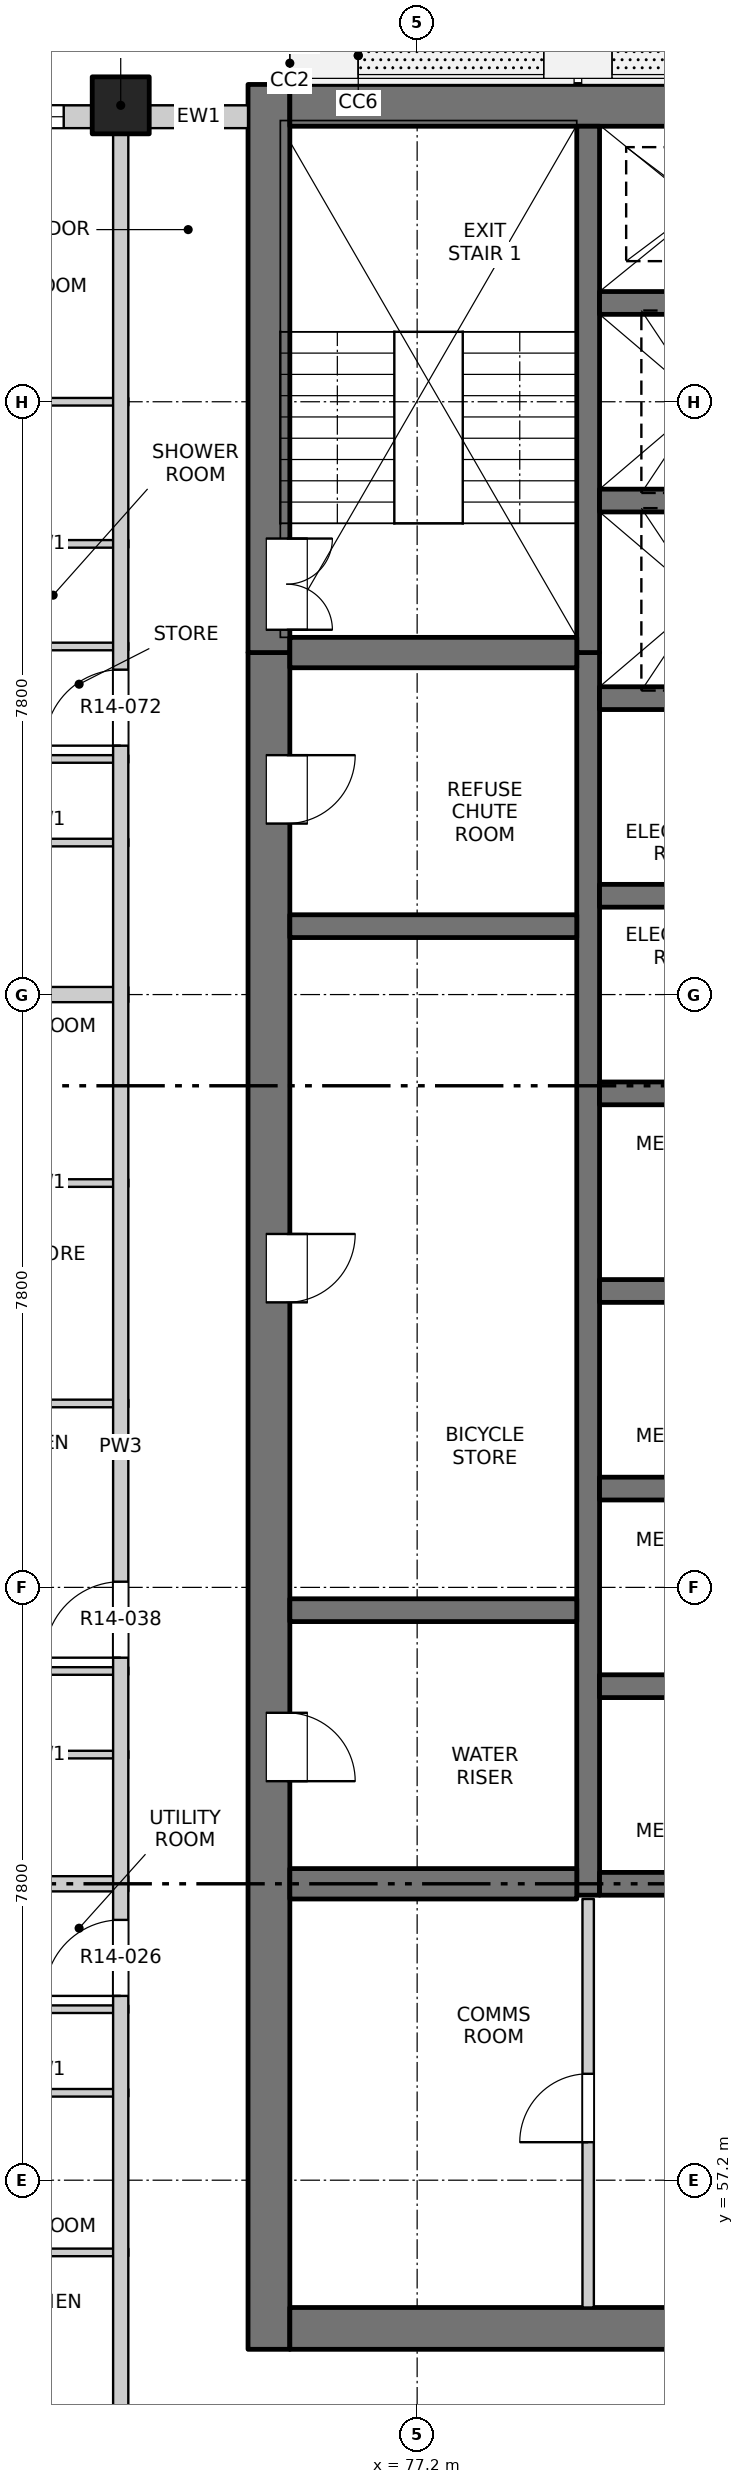
"""IFC4 building model, lengths in metres.
Left out: names, types, materials, properties, quantities, classifications, styles, units other than length and angle.
Written with IfcOpenShell. Run it as: python <this file> out.ifc"""

import sys

from ifc_helpers import new_model, si_unit, direction, frame, frame_2d, origin, origin_2d, place, context, subcontext, project, spatial, rectangle, extrude, element, fill, save


model = new_model("IFC4")
c1 = context("Model", 3, precision=1e-05, world=origin(), true_north=direction((0.0, 1.0)))
c2 = subcontext(c1, "Body", "Model", "MODEL_VIEW")
j1 = project(units=[si_unit("LENGTHUNIT", "METRE"), si_unit("PLANEANGLEUNIT", "RADIAN")], contexts=[c1])
p1 = place(None, origin())
s1 = spatial("IfcSite", under=j1, at=p1, CompositionType="ELEMENT")
p2 = place(p1, origin())
s2 = spatial("IfcBuilding", under=s1, at=p2, CompositionType="ELEMENT")
p3 = place(p2, frame((0.0, 0.0, 152.0)))
s3 = spatial("IfcBuildingStorey", under=s2, at=p3, CompositionType="ELEMENT", Elevation=152.0)
p4 = place(p3, frame((73.3, 84.5, -0.25), z_axis=(0.0, 0.0, 1.0), x_axis=(1.0, 0.0, 0.0)))
e1 = element("IfcColumn", 1, at=p4, inside=s3, PredefinedType="COLUMN", context=c2, shape_type="SweptSolid", body=[
    extrude(rectangle(XDim=0.75, YDim=0.75, at=origin_2d()), origin(), (0.0, 0.0, 1.0), 3.4),
])
p5 = place(p3, frame((75.25, 54.975, -0.25), z_axis=(0.0, 0.0, 1.0), x_axis=(0.0, 1.0, 0.0)))
e2 = element("IfcWall", 2, at=p5, inside=s3, PredefinedType="SOLIDWALL", context=c2, shape_type="SweptSolid", body=[
    extrude(rectangle(XDim=22.325, YDim=0.55, at=frame_2d((11.163, 0.0))), origin(), (0.0, 0.0, 1.0), 3.4),
])
p6 = place(p5, frame((7.475, 0.0, 0.25)))
e3 = element("IfcOpeningElement", 3, at=p6, cuts=e2, PredefinedType="OPENING", context=c2, shape_type="SweptSolid", body=[
    extrude(rectangle(XDim=0.9, YDim=2.1, at=frame_2d((0.45, 1.05))), frame((0.0, 0.285, 0.0), z_axis=(0.0, -1.0, 0.0), x_axis=(1.0, 0.0, 0.0)), (0.0, 0.0, 1.0), 0.57),
])
p7 = place(p5, frame((13.775, 0.0, 0.25)))
e4 = element("IfcOpeningElement", 4, at=p7, cuts=e2, PredefinedType="OPENING", context=c2, shape_type="SweptSolid", body=[
    extrude(rectangle(XDim=0.9, YDim=2.1, at=frame_2d((0.45, 1.05))), frame((0.0, 0.285, 0.0), z_axis=(0.0, -1.0, 0.0), x_axis=(1.0, 0.0, 0.0)), (0.0, 0.0, 1.0), 0.57),
])
p8 = place(p5, frame((20.075, 0.0, 0.25)))
e5 = element("IfcOpeningElement", 5, at=p8, cuts=e2, PredefinedType="OPENING", context=c2, shape_type="SweptSolid", body=[
    extrude(rectangle(XDim=0.9, YDim=2.1, at=frame_2d((0.45, 1.05))), frame((0.0, 0.285, 0.0), z_axis=(0.0, -1.0, 0.0), x_axis=(1.0, 0.0, 0.0)), (0.0, 0.0, 1.0), 0.57),
])
p9 = place(p3, frame((75.25, 77.3, -0.25), z_axis=(0.0, 0.0, 1.0), x_axis=(0.0, 1.0, 0.0)))
e6 = element("IfcWall", 6, at=p9, inside=s3, PredefinedType="SOLIDWALL", context=c2, shape_type="SweptSolid", body=[
    extrude(rectangle(XDim=7.475, YDim=0.55, at=frame_2d((3.737, 0.0))), origin(), (0.0, 0.0, 1.0), 3.4),
])
p10 = place(p9, frame((0.3, 0.0, 0.25)))
e7 = element("IfcOpeningElement", 7, at=p10, cuts=e6, PredefinedType="OPENING", context=c2, shape_type="SweptSolid", body=[
    extrude(rectangle(XDim=1.2, YDim=2.1, at=frame_2d((0.6, 1.05))), frame((0.0, 0.285, 0.0), z_axis=(0.0, -1.0, 0.0), x_axis=(1.0, 0.0, 0.0)), (0.0, 0.0, 1.0), 0.57),
])
p11 = place(p3, frame((75.525, 55.25, -0.25), z_axis=(0.0, 0.0, 1.0), x_axis=(1.0, 0.0, 0.0)))
e8 = element("IfcWall", 8, at=p11, inside=s3, PredefinedType="SOLIDWALL", context=c2, shape_type="SweptSolid", body=[
    extrude(rectangle(XDim=18.95, YDim=0.55, at=frame_2d((9.475, 0.0))), origin(), (0.0, 0.0, 1.0), 3.4),
])
p12 = place(p11, frame((8.725, 0.0, 0.25)))
e9 = element("IfcOpeningElement", 9, at=p12, cuts=e8, PredefinedType="OPENING", context=c2, shape_type="SweptSolid", body=[
    extrude(rectangle(XDim=1.5, YDim=2.1, at=frame_2d((0.75, 1.05))), frame((0.0, 0.285, 0.0), z_axis=(0.0, -1.0, 0.0), x_axis=(1.0, 0.0, 0.0)), (0.0, 0.0, 1.0), 0.57),
])
p13 = place(p3, frame((75.525, 84.5, -0.25), z_axis=(0.0, 0.0, 1.0), x_axis=(1.0, 0.0, 0.0)))
e10 = element("IfcWall", 10, at=p13, inside=s3, PredefinedType="SOLIDWALL", context=c2, shape_type="SweptSolid", body=[
    extrude(rectangle(XDim=18.95, YDim=0.55, at=frame_2d((9.475, 0.0))), origin(), (0.0, 0.0, 1.0), 3.4),
])
p14 = place(p3, frame((79.45, 60.95, -0.25), z_axis=(0.0, 0.0, 1.0), x_axis=(0.0, 1.0, 0.0)))
e11 = element("IfcWall", 11, at=p14, inside=s3, PredefinedType="SOLIDWALL", context=c2, shape_type="SweptSolid", body=[
    extrude(rectangle(XDim=16.35, YDim=0.3, at=frame_2d((8.175, 0.0))), origin(), (0.0, 0.0, 1.0), 3.4),
])
p15 = place(p3, frame((79.45, 77.3, -0.25), z_axis=(0.0, 0.0, 1.0), x_axis=(0.0, 1.0, 0.0)))
e12 = element("IfcWall", 12, at=p15, inside=s3, PredefinedType="SOLIDWALL", context=c2, shape_type="SweptSolid", body=[
    extrude(rectangle(XDim=6.925, YDim=0.3, at=frame_2d((3.462, 0.0))), origin(), (0.0, 0.0, 1.0), 3.4),
])
for number, where, z_axis, x_axis in (
    (13, (79.6, 61.1, -0.25), (0.0, 0.0, 1.0), (1.0, 0.0, 0.0)),
    (14, (79.6, 63.7, -0.25), (0.0, 0.0, 1.0), (1.0, 0.0, 0.0)),
    (15, (79.6, 66.3, -0.25), (0.0, 0.0, 1.0), (1.0, 0.0, 0.0)),
    (16, (79.6, 68.9, -0.25), (0.0, 0.0, 1.0), (1.0, 0.0, 0.0)),
    (17, (79.6, 71.5, -0.25), (0.0, 0.0, 1.0), (1.0, 0.0, 0.0)),
    (18, (79.6, 74.1, -0.25), (0.0, 0.0, 1.0), (1.0, 0.0, 0.0)),
    (19, (79.6, 76.7, -0.25), (0.0, 0.0, 1.0), (1.0, 0.0, 0.0)),
    (20, (79.6, 79.3, -0.25), (0.0, 0.0, 1.0), (1.0, 0.0, 0.0)),
    (21, (79.6, 81.9, -0.25), (0.0, 0.0, 1.0), (1.0, 0.0, 0.0)),
):
    element("IfcWall", number, at=place(p3, frame(where, z_axis=z_axis, x_axis=x_axis)), inside=s3, PredefinedType="SOLIDWALL", context=c2, shape_type="SweptSolid", body=[
        extrude(rectangle(XDim=3.0, YDim=0.3, at=frame_2d((1.5, 0.0))), origin(), (0.0, 0.0, 1.0), 3.4),
    ])
p16 = place(p3, frame((75.525, 61.1, -0.25), z_axis=(0.0, 0.0, 1.0), x_axis=(1.0, 0.0, 0.0)))
e22 = element("IfcWall", 22, at=p16, inside=s3, PredefinedType="SOLIDWALL", context=c2, shape_type="SweptSolid", body=[
    extrude(rectangle(XDim=3.775, YDim=0.4, at=frame_2d((1.888, 0.0))), origin(), (0.0, 0.0, 1.0), 3.4),
])
for number, where, z_axis, x_axis in (
    (23, (75.525, 64.7, -0.25), (0.0, 0.0, 1.0), (1.0, 0.0, 0.0)),
    (24, (75.525, 73.7, -0.25), (0.0, 0.0, 1.0), (1.0, 0.0, 0.0)),
):
    element("IfcWall", number, at=place(p3, frame(where, z_axis=z_axis, x_axis=x_axis)), inside=s3, PredefinedType="SOLIDWALL", context=c2, shape_type="SweptSolid", body=[
        extrude(rectangle(XDim=3.775, YDim=0.3, at=frame_2d((1.888, 0.0))), origin(), (0.0, 0.0, 1.0), 3.4),
    ])
p17 = place(p3, frame((75.525, 77.3, -0.25), z_axis=(0.0, 0.0, 1.0), x_axis=(1.0, 0.0, 0.0)))
e25 = element("IfcWall", 25, at=p17, inside=s3, PredefinedType="SOLIDWALL", context=c2, shape_type="SweptSolid", body=[
    extrude(rectangle(XDim=3.775, YDim=0.4, at=frame_2d((1.888, 0.0))), origin(), (0.0, 0.0, 1.0), 3.4),
])
p18 = place(p3, frame((69.4, 84.35, 0.0), z_axis=(0.0, 0.0, 1.0), x_axis=(1.0, 0.0, 0.0)))
e26 = element("IfcWall", 26, at=p18, inside=s3, PredefinedType="SOLIDWALL", context=c2, shape_type="SweptSolid", body=[
    extrude(rectangle(XDim=3.525, YDim=0.3, at=frame_2d((1.763, 0.0))), origin(), (0.0, 0.0, 1.0), 2.7),
])
p19 = place(p18, frame((0.75, 0.0, 0.9)))
e27 = element("IfcOpeningElement", 27, at=p19, cuts=e26, PredefinedType="OPENING", context=c2, shape_type="SweptSolid", body=[
    extrude(rectangle(XDim=2.4, YDim=1.8, at=frame_2d((1.2, 0.9))), frame((0.0, 0.16, 0.0), z_axis=(0.0, -1.0, 0.0), x_axis=(1.0, 0.0, 0.0)), (0.0, 0.0, 1.0), 0.32),
])
p20 = place(p3, frame((73.675, 84.35, 0.0), z_axis=(0.0, 0.0, 1.0), x_axis=(1.0, 0.0, 0.0)))
e28 = element("IfcWall", 28, at=p20, inside=s3, PredefinedType="SOLIDWALL", context=c2, shape_type="SweptSolid", body=[
    extrude(rectangle(XDim=1.3, YDim=0.3, at=frame_2d((0.65, 0.0))), origin(), (0.0, 0.0, 1.0), 2.7),
])
for number, where, z_axis, x_axis in (
    (29, (71.18, 56.25, 0.0), (0.0, 0.0, 1.0), (1.0, 0.0, 0.0)),
    (30, (71.18, 58.35, 0.0), (0.0, 0.0, 1.0), (1.0, 0.0, 0.0)),
    (31, (71.18, 59.45, 0.0), (0.0, 0.0, 1.0), (1.0, 0.0, 0.0)),
):
    element("IfcWall", number, at=place(p3, frame(where, z_axis=z_axis, x_axis=x_axis)), inside=s3, PredefinedType="PARTITIONING", context=c2, shape_type="SweptSolid", body=[
        extrude(rectangle(XDim=2.22, YDim=0.1, at=frame_2d((1.11, 0.0))), origin(), (0.0, 0.0, 1.0), 3.15),
    ])
p21 = place(p3, frame((65.8, 61.1, 0.0), z_axis=(0.0, 0.0, 1.0), x_axis=(1.0, 0.0, 0.0)))
e32 = element("IfcWall", 32, at=p21, inside=s3, PredefinedType="PARTITIONING", context=c2, shape_type="SweptSolid", body=[
    extrude(rectangle(XDim=7.6, YDim=0.2, at=frame_2d((3.8, 0.0))), origin(), (0.0, 0.0, 1.0), 2.55),
])
for number, where, z_axis, x_axis in (
    (33, (71.18, 62.8, 0.0), (0.0, 0.0, 1.0), (1.0, 0.0, 0.0)),
    (34, (71.18, 63.9, 0.0), (0.0, 0.0, 1.0), (1.0, 0.0, 0.0)),
    (35, (71.18, 67.42, 0.0), (0.0, 0.0, 1.0), (1.0, 0.0, 0.0)),
    (36, (71.18, 70.32, 0.0), (0.0, 0.0, 1.0), (1.0, 0.0, 0.0)),
):
    element("IfcWall", number, at=place(p3, frame(where, z_axis=z_axis, x_axis=x_axis)), inside=s3, PredefinedType="PARTITIONING", context=c2, shape_type="SweptSolid", body=[
        extrude(rectangle(XDim=2.22, YDim=0.1, at=frame_2d((1.11, 0.0))), origin(), (0.0, 0.0, 1.0), 3.15),
    ])
p22 = place(p3, frame((65.8, 72.8, 0.0), z_axis=(0.0, 0.0, 1.0), x_axis=(1.0, 0.0, 0.0)))
e37 = element("IfcWall", 37, at=p22, inside=s3, PredefinedType="PARTITIONING", context=c2, shape_type="SweptSolid", body=[
    extrude(rectangle(XDim=7.6, YDim=0.2, at=frame_2d((3.8, 0.0))), origin(), (0.0, 0.0, 1.0), 3.15),
])
for number, where, z_axis, x_axis in (
    (38, (71.18, 74.8, 0.0), (0.0, 0.0, 1.0), (1.0, 0.0, 0.0)),
    (39, (71.18, 75.9, 0.0), (0.0, 0.0, 1.0), (1.0, 0.0, 0.0)),
    (40, (71.18, 77.38, 0.0), (0.0, 0.0, 1.0), (1.0, 0.0, 0.0)),
    (41, (71.18, 78.73, 0.0), (0.0, 0.0, 1.0), (1.0, 0.0, 0.0)),
):
    element("IfcWall", number, at=place(p3, frame(where, z_axis=z_axis, x_axis=x_axis)), inside=s3, PredefinedType="PARTITIONING", context=c2, shape_type="SweptSolid", body=[
        extrude(rectangle(XDim=2.22, YDim=0.1, at=frame_2d((1.11, 0.0))), origin(), (0.0, 0.0, 1.0), 3.15),
    ])
p23 = place(p3, frame((65.8, 80.6, 0.0), z_axis=(0.0, 0.0, 1.0), x_axis=(1.0, 0.0, 0.0)))
e42 = element("IfcWall", 42, at=p23, inside=s3, PredefinedType="PARTITIONING", context=c2, shape_type="SweptSolid", body=[
    extrude(rectangle(XDim=7.6, YDim=0.1, at=frame_2d((3.8, 0.0))), origin(), (0.0, 0.0, 1.0), 3.15),
])
p24 = place(p23, frame((4.14, 0.0, 0.0)))
e43 = element("IfcOpeningElement", 43, at=p24, cuts=e42, PredefinedType="OPENING", context=c2, shape_type="SweptSolid", body=[
    extrude(rectangle(XDim=0.9, YDim=2.1, at=frame_2d((0.45, 1.05))), frame((0.0, 0.06, 0.0), z_axis=(0.0, -1.0, 0.0), x_axis=(1.0, 0.0, 0.0)), (0.0, 0.0, 1.0), 0.12),
])
p25 = place(p3, frame((73.3, 49.5, 0.0), z_axis=(0.0, 0.0, 1.0), x_axis=(0.0, 1.0, 0.0)))
e44 = element("IfcWall", 44, at=p25, inside=s3, PredefinedType="PARTITIONING", context=c2, shape_type="SweptSolid", body=[
    extrude(rectangle(XDim=34.7, YDim=0.2, at=frame_2d((17.35, 0.0))), origin(), (0.0, 0.0, 1.0), 3.15),
])
p26 = place(p25, frame((10.125, 0.0, 0.0)))
e45 = element("IfcOpeningElement", 45, at=p26, cuts=e44, PredefinedType="OPENING", context=c2, shape_type="SweptSolid", body=[
    extrude(rectangle(XDim=1.0, YDim=2.1, at=frame_2d((0.5, 1.05))), frame((0.0, 0.11, 0.0), z_axis=(0.0, -1.0, 0.0), x_axis=(1.0, 0.0, 0.0)), (0.0, 0.0, 1.0), 0.22),
])
p27 = place(p25, frame((14.575, 0.0, 0.0)))
e46 = element("IfcOpeningElement", 46, at=p27, cuts=e44, PredefinedType="OPENING", context=c2, shape_type="SweptSolid", body=[
    extrude(rectangle(XDim=1.0, YDim=2.1, at=frame_2d((0.5, 1.05))), frame((0.0, 0.11, 0.0), z_axis=(0.0, -1.0, 0.0), x_axis=(1.0, 0.0, 0.0)), (0.0, 0.0, 1.0), 0.22),
])
p28 = place(p25, frame((26.575, 0.0, 0.0)))
e47 = element("IfcOpeningElement", 47, at=p28, cuts=e44, PredefinedType="OPENING", context=c2, shape_type="SweptSolid", body=[
    extrude(rectangle(XDim=1.0, YDim=2.1, at=frame_2d((0.5, 1.05))), frame((0.0, 0.11, 0.0), z_axis=(0.0, -1.0, 0.0), x_axis=(1.0, 0.0, 0.0)), (0.0, 0.0, 1.0), 0.22),
])
p29 = place(p3, frame((79.45, 55.525, 0.0), z_axis=(0.0, 0.0, 1.0), x_axis=(0.0, 1.0, 0.0)))
e48 = element("IfcWall", 48, at=p29, inside=s3, PredefinedType="PARTITIONING", context=c2, shape_type="SweptSolid", body=[
    extrude(rectangle(XDim=5.375, YDim=0.15, at=frame_2d((2.688, 0.0))), origin(), (0.0, 0.0, 1.0), 3.15),
])
p30 = place(p29, frame((2.175, 0.0, 0.0)))
e49 = element("IfcOpeningElement", 49, at=p30, cuts=e48, PredefinedType="OPENING", context=c2, shape_type="SweptSolid", body=[
    extrude(rectangle(XDim=0.9, YDim=2.1, at=frame_2d((0.45, 1.05))), frame((0.0, 0.085, 0.0), z_axis=(0.0, -1.0, 0.0), x_axis=(1.0, 0.0, 0.0)), (0.0, 0.0, 1.0), 0.17),
])
p31 = place(p19, origin())
e50 = element("IfcWindow", 50, at=p31, inside=s3, PartitioningType="DOUBLE_PANEL_VERTICAL", PredefinedType="WINDOW", context=c2, shape_type="SweptSolid", body=[
    extrude(rectangle(XDim=2.4, YDim=1.8, at=frame_2d((1.2, 0.9))), frame((0.0, 0.03, 0.0), z_axis=(0.0, -1.0, 0.0), x_axis=(1.0, 0.0, 0.0)), (0.0, 0.0, 1.0), 0.06),
])
fill(e27, e50)
p32 = place(p30, origin())
e51 = element("IfcDoor", 51, at=p32, inside=s3, OperationType="SINGLE_SWING_LEFT", PredefinedType="DOOR", context=c2, shape_type="SweptSolid", body=[
    extrude(rectangle(XDim=0.9, YDim=2.1, at=frame_2d((0.45, 1.05))), frame((0.0, 0.025, 0.0), z_axis=(0.0, -1.0, 0.0), x_axis=(1.0, 0.0, 0.0)), (0.0, 0.0, 1.0), 0.05),
])
fill(e49, e51)
p33 = place(p26, origin())
e52 = element("IfcDoor", 52, at=p33, inside=s3, OperationType="SINGLE_SWING_RIGHT", PredefinedType="DOOR", context=c2, shape_type="SweptSolid", body=[
    extrude(rectangle(XDim=1.0, YDim=2.1, at=frame_2d((0.5, 1.05))), frame((0.0, 0.025, 0.0), z_axis=(0.0, -1.0, 0.0), x_axis=(1.0, 0.0, 0.0)), (0.0, 0.0, 1.0), 0.05),
])
fill(e45, e52)
p34 = place(p6, origin())
e53 = element("IfcDoor", 53, at=p34, inside=s3, OperationType="SINGLE_SWING_RIGHT", PredefinedType="DOOR", context=c2, shape_type="SweptSolid", body=[
    extrude(rectangle(XDim=0.9, YDim=2.1, at=frame_2d((0.45, 1.05))), frame((0.0, -0.21, 0.0), z_axis=(0.0, -1.0, 0.0), x_axis=(1.0, 0.0, 0.0)), (0.0, 0.0, 1.0), 0.05),
])
fill(e3, e53)
p35 = place(p27, origin())
e54 = element("IfcDoor", 54, at=p35, inside=s3, OperationType="SINGLE_SWING_RIGHT", PredefinedType="DOOR", context=c2, shape_type="SweptSolid", body=[
    extrude(rectangle(XDim=1.0, YDim=2.1, at=frame_2d((0.5, 1.05))), frame((0.0, 0.025, 0.0), z_axis=(0.0, -1.0, 0.0), x_axis=(1.0, 0.0, 0.0)), (0.0, 0.0, 1.0), 0.05),
])
fill(e46, e54)
p36 = place(p7, origin())
e55 = element("IfcDoor", 55, at=p36, inside=s3, OperationType="SINGLE_SWING_LEFT", PredefinedType="DOOR", context=c2, shape_type="SweptSolid", body=[
    extrude(rectangle(XDim=0.9, YDim=2.1, at=frame_2d((0.45, 1.05))), frame((0.0, -0.21, 0.0), z_axis=(0.0, -1.0, 0.0), x_axis=(1.0, 0.0, 0.0)), (0.0, 0.0, 1.0), 0.05),
])
fill(e4, e55)
p37 = place(p8, origin())
e56 = element("IfcDoor", 56, at=p37, inside=s3, OperationType="SINGLE_SWING_LEFT", PredefinedType="DOOR", context=c2, shape_type="SweptSolid", body=[
    extrude(rectangle(XDim=0.9, YDim=2.1, at=frame_2d((0.45, 1.05))), frame((0.0, -0.21, 0.0), z_axis=(0.0, -1.0, 0.0), x_axis=(1.0, 0.0, 0.0)), (0.0, 0.0, 1.0), 0.05),
])
fill(e5, e56)
p38 = place(p28, origin())
e57 = element("IfcDoor", 57, at=p38, inside=s3, OperationType="SINGLE_SWING_RIGHT", PredefinedType="DOOR", context=c2, shape_type="SweptSolid", body=[
    extrude(rectangle(XDim=1.0, YDim=2.1, at=frame_2d((0.5, 1.05))), frame((0.0, 0.025, 0.0), z_axis=(0.0, -1.0, 0.0), x_axis=(1.0, 0.0, 0.0)), (0.0, 0.0, 1.0), 0.05),
])
fill(e47, e57)
p39 = place(p10, origin())
e58 = element("IfcDoor", 58, at=p39, inside=s3, OperationType="DOUBLE_DOOR_SINGLE_SWING", PredefinedType="DOOR", context=c2, shape_type="SweptSolid", body=[
    extrude(rectangle(XDim=1.2, YDim=2.1, at=frame_2d((0.6, 1.05))), frame((0.0, -0.21, 0.0), z_axis=(0.0, -1.0, 0.0), x_axis=(1.0, 0.0, 0.0)), (0.0, 0.0, 1.0), 0.05),
])
fill(e7, e58)
save(model, sys.argv[1])
